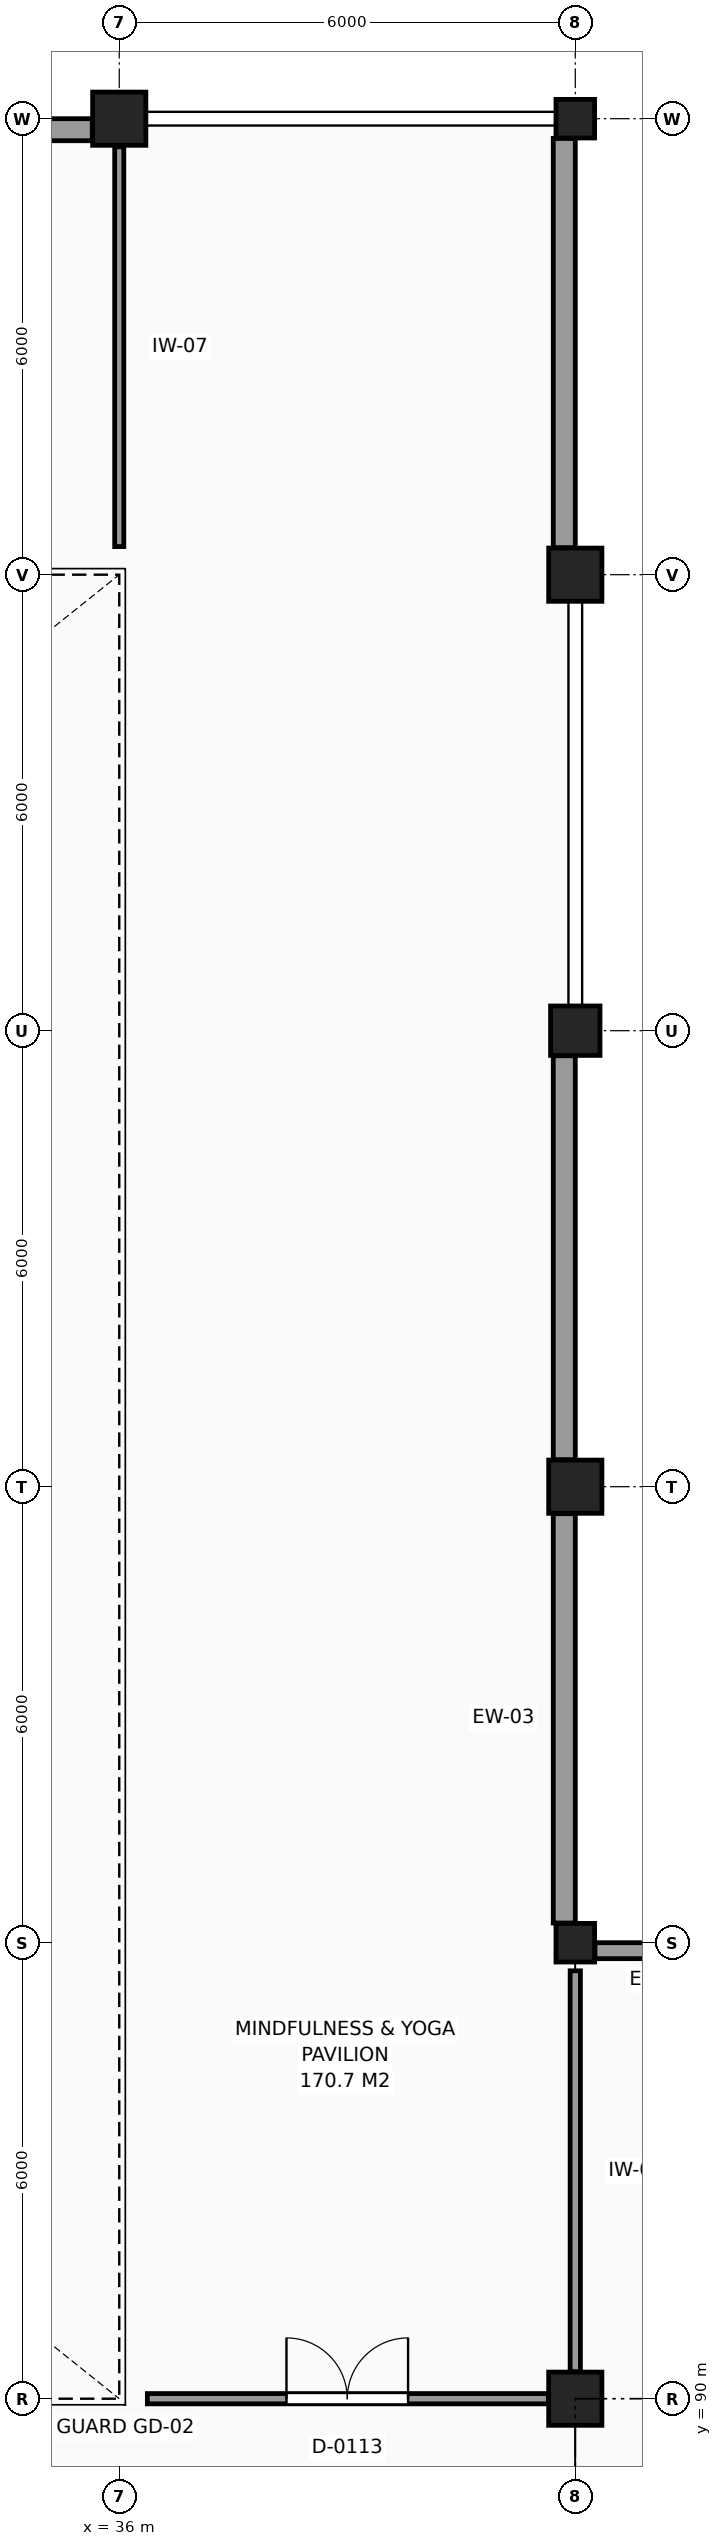
"""IFC4 building model, lengths in metres.
Left out: names, types, materials, properties, quantities, classifications, styles, units other than length and angle.
Written with IfcOpenShell. Run it as: python <this file> out.ifc"""

import sys

from ifc_helpers import new_model, si_unit, direction, frame, frame_2d, origin, origin_2d, place, context, subcontext, project, spatial, rectangle, circle, hollow_circle, extrude, element, fill, save


model = new_model("IFC4")
c1 = context("Model", 3, precision=1e-05, world=origin(), true_north=direction((0.0, 1.0)))
c2 = subcontext(c1, "Body", "Model", "MODEL_VIEW")
j1 = project(units=[si_unit("LENGTHUNIT", "METRE"), si_unit("PLANEANGLEUNIT", "RADIAN")], contexts=[c1])
p1 = place(None, origin())
s1 = spatial("IfcSite", under=j1, at=p1, CompositionType="ELEMENT")
p2 = place(p1, origin())
s2 = spatial("IfcBuilding", under=s1, at=p2, CompositionType="ELEMENT")
p3 = place(p2, frame((0.0, 0.0, 15.0)))
s3 = spatial("IfcBuildingStorey", under=s2, at=p3, CompositionType="ELEMENT", Elevation=15.0)
for number, where, z_axis, x_axis in (
    (1, (36.0, 120.0, 0.0), (0.0, 0.0, 1.0), (1.0, 0.0, 0.0)),
    (2, (42.0, 90.0, 0.0), (0.0, 0.0, 1.0), (1.0, 0.0, 0.0)),
):
    element("IfcColumn", number, at=place(p3, frame(where, z_axis=z_axis, x_axis=x_axis)), inside=s3, PredefinedType="COLUMN", context=c2, shape_type="SweptSolid", body=[
        extrude(circle(Radius=0.35, at=origin_2d()), origin(), (0.0, 0.0, 1.0), 4.8),
    ])
p4 = place(p3, frame((42.0, 96.0, 0.0), z_axis=(0.0, 0.0, 1.0), x_axis=(1.0, 0.0, 0.0)))
e3 = element("IfcColumn", 3, at=p4, inside=s3, PredefinedType="COLUMN", context=c2, shape_type="SweptSolid", body=[
    extrude(hollow_circle(Radius=0.254, WallThickness=0.025, at=origin_2d()), origin(), (0.0, 0.0, 1.0), 4.8),
])
p5 = place(p3, frame((42.0, 102.0, 0.0), z_axis=(0.0, 0.0, 1.0), x_axis=(1.0, 0.0, 0.0)))
e4 = element("IfcColumn", 4, at=p5, inside=s3, PredefinedType="COLUMN", context=c2, shape_type="SweptSolid", body=[
    extrude(rectangle(XDim=0.7, YDim=0.7, at=origin_2d()), origin(), (0.0, 0.0, 1.0), 4.8),
])
p6 = place(p3, frame((42.0, 108.0, 0.0), z_axis=(0.0, 0.0, 1.0), x_axis=(1.0, 0.0, 0.0)))
e5 = element("IfcColumn", 5, at=p6, inside=s3, PredefinedType="COLUMN", context=c2, shape_type="SweptSolid", body=[
    extrude(rectangle(XDim=0.65, YDim=0.65, at=origin_2d()), origin(), (0.0, 0.0, 1.0), 4.8),
])
p7 = place(p3, frame((42.0, 114.0, 0.0), z_axis=(0.0, 0.0, 1.0), x_axis=(1.0, 0.0, 0.0)))
e6 = element("IfcColumn", 6, at=p7, inside=s3, PredefinedType="COLUMN", context=c2, shape_type="SweptSolid", body=[
    extrude(circle(Radius=0.35, at=origin_2d()), origin(), (0.0, 0.0, 1.0), 4.8),
])
p8 = place(p3, frame((42.0, 120.0, 0.0), z_axis=(0.0, 0.0, 1.0), x_axis=(1.0, 0.0, 0.0)))
e7 = element("IfcColumn", 7, at=p8, inside=s3, PredefinedType="COLUMN", context=c2, shape_type="SweptSolid", body=[
    extrude(hollow_circle(Radius=0.254, WallThickness=0.025, at=origin_2d()), origin(), (0.0, 0.0, 1.0), 4.8),
])
p9 = place(p3, frame((47.645, 95.895, 0.0), z_axis=(0.0, 0.0, 1.0), x_axis=(-1.0, 0.0, 0.0)))
e8 = element("IfcWall", 8, at=p9, inside=s3, PredefinedType="SOLIDWALL", context=c2, shape_type="SweptSolid", body=[
    extrude(rectangle(XDim=5.386, YDim=0.21, at=frame_2d((2.693, 0.0))), origin(), (0.0, 0.0, 1.0), 3.81),
])
p10 = place(p9, frame((1.193, 0.0, 0.85)))
e9 = element("IfcOpeningElement", 9, at=p10, cuts=e8, PredefinedType="OPENING", context=c2, shape_type="SweptSolid", body=[
    extrude(rectangle(XDim=3.0, YDim=1.9, at=frame_2d((1.5, 0.95))), frame((0.0, 0.115, 0.0), z_axis=(0.0, -1.0, 0.0), x_axis=(1.0, 0.0, 0.0)), (0.0, 0.0, 1.0), 0.23),
])
p11 = place(p3, frame((41.855, 96.259, 0.0), z_axis=(0.0, 0.0, 1.0), x_axis=(0.0, 1.0, 0.0)))
e10 = element("IfcWall", 10, at=p11, inside=s3, PredefinedType="SOLIDWALL", context=c2, shape_type="SweptSolid", body=[
    extrude(rectangle(XDim=5.386, YDim=0.29, at=frame_2d((2.693, 0.0))), origin(), (0.0, 0.0, 1.0), 3.845),
])
p12 = place(p3, frame((41.855, 102.355, 0.0), z_axis=(0.0, 0.0, 1.0), x_axis=(0.0, 1.0, 0.0)))
e11 = element("IfcWall", 11, at=p12, inside=s3, PredefinedType="SOLIDWALL", context=c2, shape_type="SweptSolid", body=[
    extrude(rectangle(XDim=5.315, YDim=0.29, at=frame_2d((2.657, 0.0))), origin(), (0.0, 0.0, 1.0), 3.845),
])
p13 = place(p3, frame((41.855, 114.355, 0.0), z_axis=(0.0, 0.0, 1.0), x_axis=(0.0, 1.0, 0.0)))
e12 = element("IfcWall", 12, at=p13, inside=s3, PredefinedType="SOLIDWALL", context=c2, shape_type="SweptSolid", body=[
    extrude(rectangle(XDim=5.386, YDim=0.29, at=frame_2d((2.693, 0.0))), origin(), (0.0, 0.0, 1.0), 4.45),
])
p14 = place(p3, frame((35.645, 119.855, 0.0), z_axis=(0.0, 0.0, 1.0), x_axis=(-1.0, 0.0, 0.0)))
e13 = element("IfcWall", 13, at=p14, inside=s3, PredefinedType="SOLIDWALL", context=c2, shape_type="SweptSolid", body=[
    extrude(rectangle(XDim=5.315, YDim=0.29, at=frame_2d((2.657, 0.0))), origin(), (0.0, 0.0, 1.0), 4.45),
])
p15 = place(p3, frame((36.0, 114.37, 0.0), z_axis=(0.0, 0.0, 1.0), x_axis=(0.0, 1.0, 0.0)))
e14 = element("IfcWall", 14, at=p15, inside=s3, PredefinedType="PARTITIONING", context=c2, shape_type="SweptSolid", body=[
    extrude(rectangle(XDim=5.26, YDim=0.12, at=frame_2d((2.63, 0.0))), origin(), (0.0, 0.0, 1.0), 4.45),
])
p16 = place(p3, frame((42.0, 90.355, 0.0), z_axis=(0.0, 0.0, 1.0), x_axis=(0.0, 1.0, 0.0)))
e15 = element("IfcWall", 15, at=p16, inside=s3, PredefinedType="PARTITIONING", context=c2, shape_type="SweptSolid", body=[
    extrude(rectangle(XDim=5.275, YDim=0.135, at=frame_2d((2.637, 0.0))), origin(), (0.0, 0.0, 1.0), 3.795),
])
p17 = place(p3, frame((36.37, 90.0, 0.0), z_axis=(0.0, 0.0, 1.0), x_axis=(1.0, 0.0, 0.0)))
e16 = element("IfcWall", 16, at=p17, inside=s3, PredefinedType="PARTITIONING", context=c2, shape_type="SweptSolid", body=[
    extrude(rectangle(XDim=5.275, YDim=0.135, at=frame_2d((2.637, 0.0))), origin(), (0.0, 0.0, 1.0), 4.45),
])
p18 = place(p17, frame((1.83, 0.0, 0.0)))
e17 = element("IfcOpeningElement", 17, at=p18, cuts=e16, PredefinedType="OPENING", context=c2, shape_type="SweptSolid", body=[
    extrude(rectangle(XDim=1.6, YDim=2.25, at=frame_2d((0.8, 1.125))), frame((0.0, 0.078, 0.0), z_axis=(0.0, -1.0, 0.0), x_axis=(1.0, 0.0, 0.0)), (0.0, 0.0, 1.0), 0.155),
])
p19 = place(p18, origin())
e18 = element("IfcDoor", 18, at=p19, inside=s3, OperationType="DOUBLE_DOOR_SINGLE_SWING", PredefinedType="DOOR", context=c2, shape_type="SweptSolid", body=[
    extrude(rectangle(XDim=1.6, YDim=2.25, at=frame_2d((0.8, 1.125))), frame((0.0, 0.025, 0.0), z_axis=(0.0, -1.0, 0.0), x_axis=(1.0, 0.0, 0.0)), (0.0, 0.0, 1.0), 0.05),
])
fill(e17, e18)
save(model, sys.argv[1])
